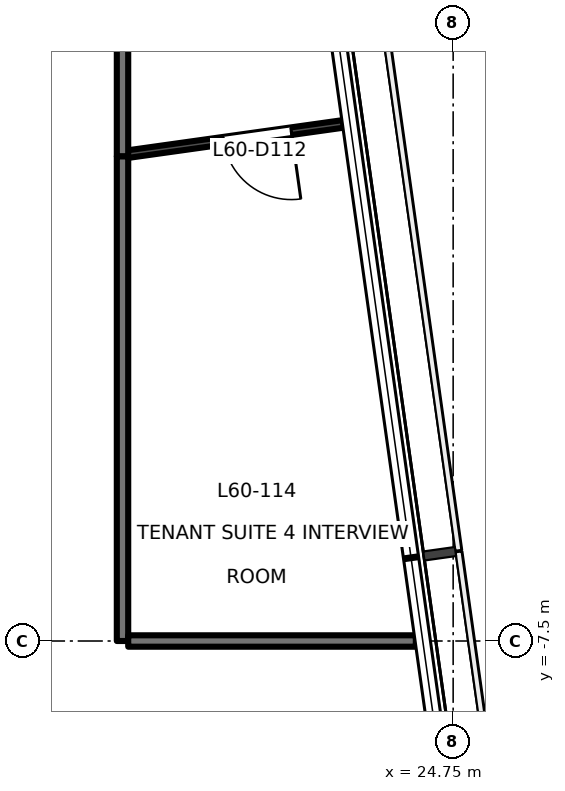
"""IFC4 building model, lengths in metres.
Left out: names, types, materials, properties, quantities, classifications, styles, units other than length and angle.
Written with IfcOpenShell. Run it as: python <this file> out.ifc"""

import sys

from ifc_helpers import new_model, si_unit, direction, frame, frame_2d, origin, place, context, subcontext, project, spatial, rectangle, extrude, element, fill, save


model = new_model("IFC4")
c1 = context("Model", 3, precision=1e-05, world=origin(), true_north=direction((0.0, 1.0)))
c2 = subcontext(c1, "Body", "Model", "MODEL_VIEW")
j1 = project(units=[si_unit("LENGTHUNIT", "METRE"), si_unit("PLANEANGLEUNIT", "RADIAN")], contexts=[c1])
p1 = place(None, origin())
s1 = spatial("IfcSite", under=j1, at=p1, CompositionType="ELEMENT")
p2 = place(p1, origin())
s2 = spatial("IfcBuilding", under=s1, at=p2, CompositionType="ELEMENT")
p3 = place(p2, frame((0.0, 0.0, 262.9)))
s3 = spatial("IfcBuildingStorey", under=s2, at=p3, CompositionType="ELEMENT", Elevation=262.9)
p4 = place(p3, frame((20.4, 5.5, 0.0), z_axis=(0.0, 0.0, 1.0), x_axis=(0.0, -1.0, 0.0)))
e1 = element("IfcWall", 1, at=p4, inside=s3, PredefinedType="PARTITIONING", context=c2, shape_type="SweptSolid", body=[
    extrude(rectangle(XDim=6.625, YDim=0.15, at=frame_2d((3.312, 0.0))), origin(), (0.0, 0.0, 1.0), 3.4),
])
p5 = place(p4, frame((2.562, 0.0, 0.0)))
e2 = element("IfcOpeningElement", 2, at=p5, cuts=e1, PredefinedType="OPENING", context=c2, shape_type="SweptSolid", body=[
    extrude(rectangle(XDim=1.5, YDim=2.1, at=frame_2d((0.75, 1.05))), frame((0.0, 0.085, 0.0), z_axis=(0.0, -1.0, 0.0), x_axis=(1.0, 0.0, 0.0)), (0.0, 0.0, 1.0), 0.171),
])
p6 = place(p3, frame((20.4, -1.125, 0.0), z_axis=(0.0, 0.0, 1.0), x_axis=(0.0, -1.0, 0.0)))
e3 = element("IfcWall", 3, at=p6, inside=s3, PredefinedType="PARTITIONING", context=c2, shape_type="SweptSolid", body=[
    extrude(rectangle(XDim=6.375, YDim=0.15, at=frame_2d((3.188, 0.0))), origin(), (0.0, 0.0, 1.0), 3.4),
])
p7 = place(p3, frame((20.475, -7.5, 0.0), z_axis=(0.0, 0.0, 1.0), x_axis=(1.0, 0.0, 0.0)))
e4 = element("IfcWall", 4, at=p7, inside=s3, PredefinedType="PARTITIONING", context=c2, shape_type="SweptSolid", body=[
    extrude(rectangle(XDim=3.784, YDim=0.15, at=frame_2d((1.892, 0.0))), origin(), (0.0, 0.0, 1.0), 3.7),
])
p8 = place(p3, frame((23.303, -0.697, 0.0), z_axis=(0.0, 0.0, 1.0), x_axis=(-0.990291093887, -0.139009170086, 0.0)))
e5 = element("IfcWall", 5, at=p8, inside=s3, PredefinedType="PARTITIONING", context=c2, shape_type="SweptSolid", body=[
    extrude(rectangle(XDim=2.863, YDim=0.1, at=frame_2d((1.431, 0.0))), origin(), (0.0, 0.0, 1.0), 3.7),
])
p9 = place(p8, frame((0.689, 0.0, 0.0)))
e6 = element("IfcOpeningElement", 6, at=p9, cuts=e5, PredefinedType="OPENING", context=c2, shape_type="SweptSolid", body=[
    extrude(rectangle(XDim=0.9, YDim=2.1, at=frame_2d((0.45, 1.05))), frame((0.0, 0.061, 0.0), z_axis=(0.0, -1.0, 0.0), x_axis=(1.0, 0.0, 0.0)), (0.0, 0.0, 1.0), 0.121),
])
p10 = place(p9, origin())
e7 = element("IfcDoor", 7, at=p10, inside=s3, OperationType="SINGLE_SWING_LEFT", PredefinedType="DOOR", context=c2, shape_type="SweptSolid", body=[
    extrude(rectangle(XDim=0.9, YDim=2.1, at=frame_2d((0.45, 1.05))), frame((0.0, 0.025, 0.0), z_axis=(0.0, -1.0, 0.0), x_axis=(1.0, 0.0, 0.0)), (0.0, 0.0, 1.0), 0.05),
])
fill(e6, e7)
save(model, sys.argv[1])
